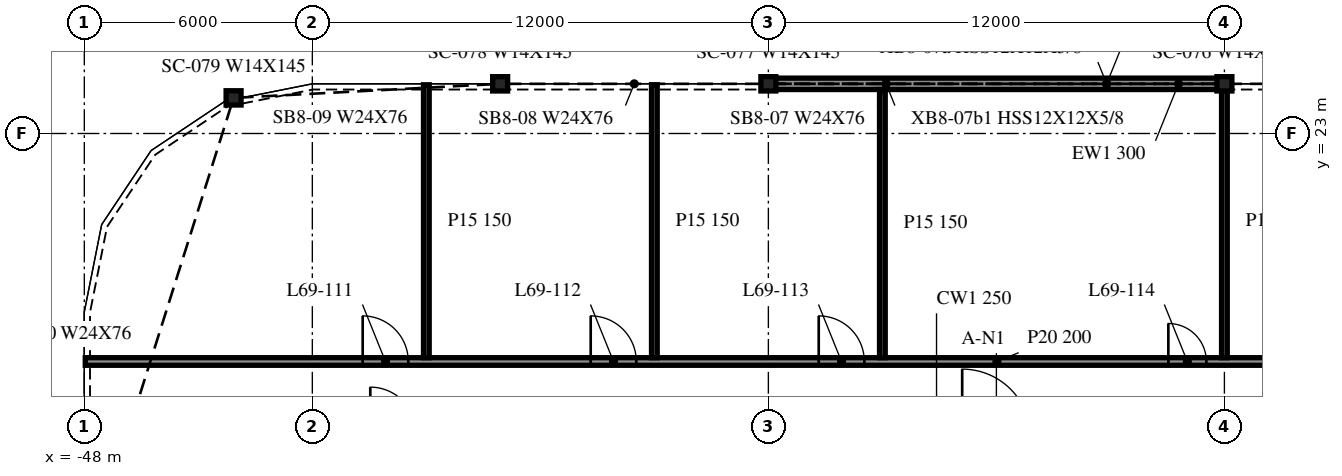
"""IFC4 building model, lengths in metres.
Left out: names, types, materials, properties, quantities, classifications, styles, units other than length and angle.
Written with IfcOpenShell. Run it as: python <this file> out.ifc"""

import sys

from ifc_helpers import new_model, si_unit, direction, frame, frame_2d, origin, origin_2d, place, context, subcontext, project, spatial, rectangle, i_section, extrude, element, fill, save


model = new_model("IFC4")
c1 = context("Model", 3, precision=1e-05, world=origin(), true_north=direction((0.0, 1.0)))
c2 = subcontext(c1, "Body", "Model", "MODEL_VIEW")
j1 = project(units=[si_unit("LENGTHUNIT", "METRE"), si_unit("PLANEANGLEUNIT", "RADIAN")], contexts=[c1])
p1 = place(None, origin())
s1 = spatial("IfcSite", under=j1, at=p1, CompositionType="ELEMENT")
p2 = place(p1, origin())
s2 = spatial("IfcBuilding", under=s1, at=p2, CompositionType="ELEMENT")
p3 = place(p2, frame((0.0, 0.0, 282.3)))
s3 = spatial("IfcBuildingStorey", under=s2, at=p3, CompositionType="ELEMENT", Elevation=282.3)
for number, where, z_axis, x_axis in (
    (1, (-18.0, 24.307, -0.34), (0.0, 0.0, 1.0), (1.0, 0.0, 0.0)),
    (2, (-30.0, 24.307, -0.34), (0.0, 0.0, 1.0), (1.0, 0.0, 0.0)),
    (3, (-37.058, 24.307, -0.34), (0.0, 0.0, 1.0), (1.0, 0.0, 0.0)),
    (4, (-44.072, 23.937, -0.34), (0.0, 0.0, 1.0), (1.0, 0.0, 0.0)),
):
    element("IfcColumn", number, at=place(p3, frame(where, z_axis=z_axis, x_axis=x_axis)), inside=s3, PredefinedType="COLUMN", context=c2, shape_type="SweptSolid", body=[
        extrude(i_section(OverallWidth=0.394, OverallDepth=0.376, WebThickness=0.017, FlangeThickness=0.028, at=origin_2d()), origin(), (0.0, 0.0, 1.0), 3.8),
    ])
p4 = place(p3, frame((-18.009, 24.307, 0.0), z_axis=(0.0, 0.0, 1.0), x_axis=(-1.0, 0.0, 0.0)))
e5 = element("IfcWall", 5, at=p4, inside=s3, PredefinedType="NOTDEFINED", context=c2, shape_type="SweptSolid", body=[
    extrude(rectangle(XDim=11.983, YDim=0.3, at=frame_2d((5.991, 0.0))), origin(), (0.0, 0.0, 1.0), 3.46),
])
p5 = place(p3, frame((-47.975, 17.0, 0.0), z_axis=(0.0, 0.0, 1.0), x_axis=(1.0, 0.0, 0.0)))
e6 = element("IfcWall", 6, at=p5, inside=s3, PredefinedType="PARTITIONING", context=c2, shape_type="SweptSolid", body=[
    extrude(rectangle(XDim=95.95, YDim=0.2, at=frame_2d((47.975, 0.0))), origin(), (0.0, 0.0, 1.0), 3.4),
])
p6 = place(p5, frame((7.3, 0.0, 0.0)))
e7 = element("IfcOpeningElement", 7, at=p6, cuts=e6, PredefinedType="OPENING", context=c2, shape_type="SweptSolid", body=[
    extrude(rectangle(XDim=1.2, YDim=2.1, at=frame_2d((0.6, 1.05))), frame((0.0, 0.11, 0.0), z_axis=(0.0, -1.0, 0.0), x_axis=(1.0, 0.0, 0.0)), (0.0, 0.0, 1.0), 0.22),
])
p7 = place(p5, frame((13.3, 0.0, 0.0)))
e8 = element("IfcOpeningElement", 8, at=p7, cuts=e6, PredefinedType="OPENING", context=c2, shape_type="SweptSolid", body=[
    extrude(rectangle(XDim=1.2, YDim=2.1, at=frame_2d((0.6, 1.05))), frame((0.0, 0.11, 0.0), z_axis=(0.0, -1.0, 0.0), x_axis=(1.0, 0.0, 0.0)), (0.0, 0.0, 1.0), 0.22),
])
p8 = place(p5, frame((19.3, 0.0, 0.0)))
e9 = element("IfcOpeningElement", 9, at=p8, cuts=e6, PredefinedType="OPENING", context=c2, shape_type="SweptSolid", body=[
    extrude(rectangle(XDim=1.2, YDim=2.1, at=frame_2d((0.6, 1.05))), frame((0.0, 0.11, 0.0), z_axis=(0.0, -1.0, 0.0), x_axis=(1.0, 0.0, 0.0)), (0.0, 0.0, 1.0), 0.22),
])
p9 = place(p5, frame((28.5, 0.0, 0.0)))
e10 = element("IfcOpeningElement", 10, at=p9, cuts=e6, PredefinedType="OPENING", context=c2, shape_type="SweptSolid", body=[
    extrude(rectangle(XDim=1.0, YDim=2.1, at=frame_2d((0.5, 1.05))), frame((0.0, 0.11, 0.0), z_axis=(0.0, -1.0, 0.0), x_axis=(1.0, 0.0, 0.0)), (0.0, 0.0, 1.0), 0.22),
])
p10 = place(p5, frame((31.3, 0.0, 0.0)))
e11 = element("IfcOpeningElement", 11, at=p10, cuts=e6, PredefinedType="OPENING", context=c2, shape_type="SweptSolid", body=[
    extrude(rectangle(XDim=1.2, YDim=2.1, at=frame_2d((0.6, 1.05))), frame((0.0, 0.11, 0.0), z_axis=(0.0, -1.0, 0.0), x_axis=(1.0, 0.0, 0.0)), (0.0, 0.0, 1.0), 0.22),
])
p11 = place(p5, frame((37.5, 0.0, 0.0)))
e12 = element("IfcOpeningElement", 12, at=p11, cuts=e6, PredefinedType="OPENING", context=c2, shape_type="SweptSolid", body=[
    extrude(rectangle(XDim=1.0, YDim=2.1, at=frame_2d((0.5, 1.05))), frame((0.0, 0.11, 0.0), z_axis=(0.0, -1.0, 0.0), x_axis=(1.0, 0.0, 0.0)), (0.0, 0.0, 1.0), 0.22),
])
p12 = place(p5, frame((43.3, 0.0, 0.0)))
e13 = element("IfcOpeningElement", 13, at=p12, cuts=e6, PredefinedType="OPENING", context=c2, shape_type="SweptSolid", body=[
    extrude(rectangle(XDim=1.2, YDim=2.1, at=frame_2d((0.6, 1.05))), frame((0.0, 0.11, 0.0), z_axis=(0.0, -1.0, 0.0), x_axis=(1.0, 0.0, 0.0)), (0.0, 0.0, 1.0), 0.22),
])
p13 = place(p5, frame((47.3, 0.0, 0.0)))
e14 = element("IfcOpeningElement", 14, at=p13, cuts=e6, PredefinedType="OPENING", context=c2, shape_type="SweptSolid", body=[
    extrude(rectangle(XDim=1.2, YDim=2.1, at=frame_2d((0.6, 1.05))), frame((0.0, 0.11, 0.0), z_axis=(0.0, -1.0, 0.0), x_axis=(1.0, 0.0, 0.0)), (0.0, 0.0, 1.0), 0.22),
])
p14 = place(p5, frame((51.1, 0.0, 0.0)))
e15 = element("IfcOpeningElement", 15, at=p14, cuts=e6, PredefinedType="OPENING", context=c2, shape_type="SweptSolid", body=[
    extrude(rectangle(XDim=1.2, YDim=2.1, at=frame_2d((0.6, 1.05))), frame((0.0, 0.11, 0.0), z_axis=(0.0, -1.0, 0.0), x_axis=(1.0, 0.0, 0.0)), (0.0, 0.0, 1.0), 0.22),
])
p15 = place(p5, frame((60.1, 0.0, 0.0)))
e16 = element("IfcOpeningElement", 16, at=p15, cuts=e6, PredefinedType="OPENING", context=c2, shape_type="SweptSolid", body=[
    extrude(rectangle(XDim=1.0, YDim=2.1, at=frame_2d((0.5, 1.05))), frame((0.0, 0.11, 0.0), z_axis=(0.0, -1.0, 0.0), x_axis=(1.0, 0.0, 0.0)), (0.0, 0.0, 1.0), 0.22),
])
p16 = place(p5, frame((63.1, 0.0, 0.0)))
e17 = element("IfcOpeningElement", 17, at=p16, cuts=e6, PredefinedType="OPENING", context=c2, shape_type="SweptSolid", body=[
    extrude(rectangle(XDim=1.2, YDim=2.1, at=frame_2d((0.6, 1.05))), frame((0.0, 0.11, 0.0), z_axis=(0.0, -1.0, 0.0), x_axis=(1.0, 0.0, 0.0)), (0.0, 0.0, 1.0), 0.22),
])
p17 = place(p5, frame((69.1, 0.0, 0.0)))
e18 = element("IfcOpeningElement", 18, at=p17, cuts=e6, PredefinedType="OPENING", context=c2, shape_type="SweptSolid", body=[
    extrude(rectangle(XDim=1.0, YDim=2.1, at=frame_2d((0.5, 1.05))), frame((0.0, 0.11, 0.0), z_axis=(0.0, -1.0, 0.0), x_axis=(1.0, 0.0, 0.0)), (0.0, 0.0, 1.0), 0.22),
])
p18 = place(p5, frame((75.1, 0.0, 0.0)))
e19 = element("IfcOpeningElement", 19, at=p18, cuts=e6, PredefinedType="OPENING", context=c2, shape_type="SweptSolid", body=[
    extrude(rectangle(XDim=1.2, YDim=2.1, at=frame_2d((0.6, 1.05))), frame((0.0, 0.11, 0.0), z_axis=(0.0, -1.0, 0.0), x_axis=(1.0, 0.0, 0.0)), (0.0, 0.0, 1.0), 0.22),
])
p19 = place(p5, frame((81.1, 0.0, 0.0)))
e20 = element("IfcOpeningElement", 20, at=p19, cuts=e6, PredefinedType="OPENING", context=c2, shape_type="SweptSolid", body=[
    extrude(rectangle(XDim=1.2, YDim=2.1, at=frame_2d((0.6, 1.05))), frame((0.0, 0.11, 0.0), z_axis=(0.0, -1.0, 0.0), x_axis=(1.0, 0.0, 0.0)), (0.0, 0.0, 1.0), 0.22),
])
p20 = place(p5, frame((90.1, 0.0, 0.0)))
e21 = element("IfcOpeningElement", 21, at=p20, cuts=e6, PredefinedType="OPENING", context=c2, shape_type="SweptSolid", body=[
    extrude(rectangle(XDim=1.2, YDim=2.1, at=frame_2d((0.6, 1.05))), frame((0.0, 0.11, 0.0), z_axis=(0.0, -1.0, 0.0), x_axis=(1.0, 0.0, 0.0)), (0.0, 0.0, 1.0), 0.22),
])
for number, where, z_axis, x_axis in (
    (22, (-39.0, 17.1, 0.0), (0.0, 0.0, 1.0), (0.0, 1.0, 0.0)),
    (23, (-33.0, 17.1, 0.0), (0.0, 0.0, 1.0), (0.0, 1.0, 0.0)),
):
    element("IfcWall", number, at=place(p3, frame(where, z_axis=z_axis, x_axis=x_axis)), inside=s3, PredefinedType="PARTITIONING", context=c2, shape_type="SweptSolid", body=[
        extrude(rectangle(XDim=7.182, YDim=0.15, at=frame_2d((3.591, 0.0))), origin(), (0.0, 0.0, 1.0), 3.4),
    ])
p21 = place(p3, frame((-27.0, 17.1, 0.0), z_axis=(0.0, 0.0, 1.0), x_axis=(0.0, 1.0, 0.0)))
e24 = element("IfcWall", 24, at=p21, inside=s3, PredefinedType="PARTITIONING", context=c2, shape_type="SweptSolid", body=[
    extrude(rectangle(XDim=7.057, YDim=0.15, at=frame_2d((3.528, 0.0))), origin(), (0.0, 0.0, 1.0), 3.4),
])
p22 = place(p3, frame((-18.0, 17.1, 0.0), z_axis=(0.0, 0.0, 1.0), x_axis=(0.0, 1.0, 0.0)))
e25 = element("IfcWall", 25, at=p22, inside=s3, PredefinedType="PARTITIONING", context=c2, shape_type="SweptSolid", body=[
    extrude(rectangle(XDim=7.182, YDim=0.15, at=frame_2d((3.591, 0.0))), origin(), (0.0, 0.0, 1.0), 3.4),
])
p23 = place(p6, origin())
e26 = element("IfcDoor", 26, at=p23, inside=s3, OperationType="SINGLE_SWING_LEFT", PredefinedType="DOOR", context=c2, shape_type="SweptSolid", body=[
    extrude(rectangle(XDim=1.2, YDim=2.1, at=frame_2d((0.6, 1.05))), frame((0.0, 0.025, 0.0), z_axis=(0.0, -1.0, 0.0), x_axis=(1.0, 0.0, 0.0)), (0.0, 0.0, 1.0), 0.05),
])
fill(e7, e26)
p24 = place(p7, origin())
e27 = element("IfcDoor", 27, at=p24, inside=s3, OperationType="SINGLE_SWING_LEFT", PredefinedType="DOOR", context=c2, shape_type="SweptSolid", body=[
    extrude(rectangle(XDim=1.2, YDim=2.1, at=frame_2d((0.6, 1.05))), frame((0.0, 0.025, 0.0), z_axis=(0.0, -1.0, 0.0), x_axis=(1.0, 0.0, 0.0)), (0.0, 0.0, 1.0), 0.05),
])
fill(e8, e27)
p25 = place(p8, origin())
e28 = element("IfcDoor", 28, at=p25, inside=s3, OperationType="SINGLE_SWING_LEFT", PredefinedType="DOOR", context=c2, shape_type="SweptSolid", body=[
    extrude(rectangle(XDim=1.2, YDim=2.1, at=frame_2d((0.6, 1.05))), frame((0.0, 0.025, 0.0), z_axis=(0.0, -1.0, 0.0), x_axis=(1.0, 0.0, 0.0)), (0.0, 0.0, 1.0), 0.05),
])
fill(e9, e28)
p26 = place(p9, origin())
e29 = element("IfcDoor", 29, at=p26, inside=s3, OperationType="SINGLE_SWING_LEFT", PredefinedType="DOOR", context=c2, shape_type="SweptSolid", body=[
    extrude(rectangle(XDim=1.0, YDim=2.1, at=frame_2d((0.5, 1.05))), frame((0.0, 0.025, 0.0), z_axis=(0.0, -1.0, 0.0), x_axis=(1.0, 0.0, 0.0)), (0.0, 0.0, 1.0), 0.05),
])
fill(e10, e29)
save(model, sys.argv[1])
